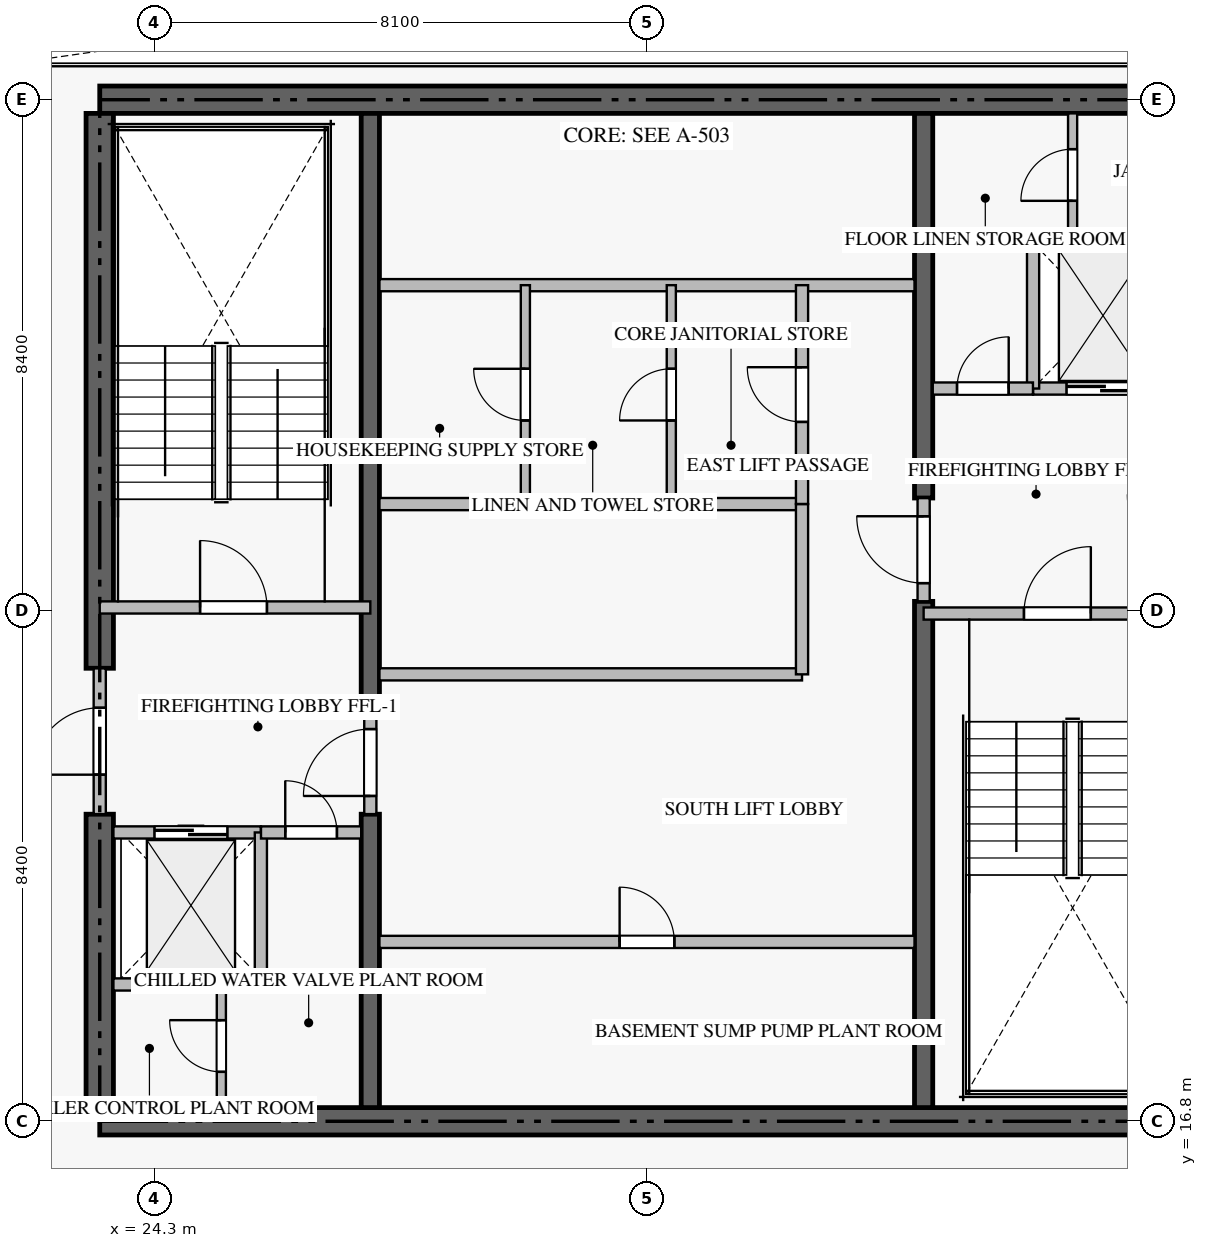
"""IFC4 building model, lengths in metres.
Left out: names, types, materials, properties, quantities, classifications, styles, units other than length and angle.
Written with IfcOpenShell. Run it as: python <this file> out.ifc"""

import sys

from ifc_helpers import new_model, si_unit, direction, frame, frame_2d, origin, place, context, subcontext, project, spatial, rectangle, extrude, source, transform, mapped, element, fill, save


model = new_model("IFC4")
c1 = context("Model", 3, precision=1e-05, world=origin(), true_north=direction((0.0, 1.0)))
c2 = subcontext(c1, "Body", "Model", "MODEL_VIEW")
j1 = project(units=[si_unit("LENGTHUNIT", "METRE"), si_unit("PLANEANGLEUNIT", "RADIAN")], contexts=[c1])
p1 = place(None, origin())
s1 = spatial("IfcSite", under=j1, at=p1, CompositionType="ELEMENT")
p2 = place(p1, origin())
s2 = spatial("IfcBuilding", under=s1, at=p2, CompositionType="ELEMENT")
p3 = place(p2, frame((0.0, 0.0, -3.6)))
s3 = spatial("IfcBuildingStorey", under=s2, at=p3, CompositionType="ELEMENT", Elevation=-3.6)
for number, where, z_axis, x_axis in (
    (1, (23.4, 16.8, -0.36), (0.0, 0.0, 1.0), (1.0, 0.0, 0.0)),
    (2, (41.4, 33.6, -0.36), (0.0, 0.0, 1.0), (-1.0, 0.0, 0.0)),
):
    element("IfcWall", number, at=place(p3, frame(where, z_axis=z_axis, x_axis=x_axis)), inside=s3, PredefinedType="SHEAR", context=c2, shape_type="SweptSolid", body=[
        extrude(rectangle(XDim=18.0, YDim=0.45, at=frame_2d((9.0, 0.0))), origin(), (0.0, 0.0, 1.0), 3.578),
    ])
p4 = place(p3, frame((23.4, 17.025, -0.36), z_axis=(0.0, 0.0, 1.0), x_axis=(0.0, 1.0, 0.0)))
e3 = element("IfcWall", 3, at=p4, inside=s3, PredefinedType="SHEAR", context=c2, shape_type="SweptSolid", body=[
    extrude(rectangle(XDim=4.825, YDim=0.45, at=frame_2d((2.413, 0.0))), origin(), (0.0, 0.0, 1.0), 3.578),
])
p5 = place(p3, frame((23.4, 24.25, -0.36), z_axis=(0.0, 0.0, 1.0), x_axis=(0.0, 1.0, 0.0)))
e4 = element("IfcWall", 4, at=p5, inside=s3, PredefinedType="SHEAR", context=c2, shape_type="SweptSolid", body=[
    extrude(rectangle(XDim=9.125, YDim=0.45, at=frame_2d((4.562, 0.0))), origin(), (0.0, 0.0, 1.0), 3.578),
])
p6 = place(p3, frame((27.85, 17.025, -0.36), z_axis=(0.0, 0.0, 1.0), x_axis=(0.0, 1.0, 0.0)))
e5 = element("IfcWall", 5, at=p6, inside=s3, PredefinedType="SHEAR", context=c2, shape_type="SweptSolid", body=[
    extrude(rectangle(XDim=4.825, YDim=0.3, at=frame_2d((2.413, 0.0))), origin(), (0.0, 0.0, 1.0), 3.578),
])
p7 = place(p3, frame((27.85, 23.55, -0.36), z_axis=(0.0, 0.0, 1.0), x_axis=(0.0, 1.0, 0.0)))
e6 = element("IfcWall", 6, at=p7, inside=s3, PredefinedType="SHEAR", context=c2, shape_type="SweptSolid", body=[
    extrude(rectangle(XDim=9.825, YDim=0.3, at=frame_2d((4.913, 0.0))), origin(), (0.0, 0.0, 1.0), 3.578),
])
p8 = place(p3, frame((36.95, 17.025, -0.36), z_axis=(0.0, 0.0, 1.0), x_axis=(0.0, 1.0, 0.0)))
e7 = element("IfcWall", 7, at=p8, inside=s3, PredefinedType="SHEAR", context=c2, shape_type="SweptSolid", body=[
    extrude(rectangle(XDim=8.325, YDim=0.3, at=frame_2d((4.163, 0.0))), origin(), (0.0, 0.0, 1.0), 3.578),
])
p9 = place(p3, frame((36.95, 27.05, -0.36), z_axis=(0.0, 0.0, 1.0), x_axis=(0.0, 1.0, 0.0)))
e8 = element("IfcWall", 8, at=p9, inside=s3, PredefinedType="SHEAR", context=c2, shape_type="SweptSolid", body=[
    extrude(rectangle(XDim=6.325, YDim=0.3, at=frame_2d((3.163, 0.0))), origin(), (0.0, 0.0, 1.0), 3.578),
])
p10 = place(p3, frame((23.4, 25.25, 0.0), z_axis=(0.0, 0.0, 1.0), x_axis=(1.0, 0.0, 0.0)))
e9 = element("IfcWall", 9, at=p10, inside=s3, PredefinedType="STANDARD", context=c2, shape_type="SweptSolid", body=[
    extrude(rectangle(XDim=4.45, YDim=0.2, at=frame_2d((2.225, 0.0))), origin(), (0.0, 0.0, 1.0), 3.22),
])
p11 = place(p10, frame((1.65, 0.0, 0.0)))
e10 = element("IfcOpeningElement", 10, at=p11, cuts=e9, PredefinedType="OPENING", context=c2, shape_type="SweptSolid", body=[
    extrude(rectangle(XDim=1.1, YDim=2.15, at=frame_2d((0.55, 1.075))), frame((0.0, 0.11, 0.0), z_axis=(0.0, -1.0, 0.0), x_axis=(1.0, 0.0, 0.0)), (0.0, 0.0, 1.0), 0.22),
])
p12 = place(p3, frame((36.95, 25.15, 0.0), z_axis=(0.0, 0.0, 1.0), x_axis=(1.0, 0.0, 0.0)))
e11 = element("IfcWall", 11, at=p12, inside=s3, PredefinedType="STANDARD", context=c2, shape_type="SweptSolid", body=[
    extrude(rectangle(XDim=4.45, YDim=0.2, at=frame_2d((2.225, 0.0))), origin(), (0.0, 0.0, 1.0), 3.22),
])
p13 = place(p12, frame((1.65, 0.0, 0.0)))
e12 = element("IfcOpeningElement", 12, at=p13, cuts=e11, PredefinedType="OPENING", context=c2, shape_type="SweptSolid", body=[
    extrude(rectangle(XDim=1.1, YDim=2.15, at=frame_2d((0.55, 1.075))), frame((0.0, 0.11, 0.0), z_axis=(0.0, -1.0, 0.0), x_axis=(1.0, 0.0, 0.0)), (0.0, 0.0, 1.0), 0.22),
])
p14 = place(p3, frame((23.625, 21.55, 0.0), z_axis=(0.0, 0.0, 1.0), x_axis=(1.0, 0.0, 0.0)))
e13 = element("IfcWall", 13, at=p14, inside=s3, PredefinedType="STANDARD", context=c2, shape_type="SweptSolid", body=[
    extrude(rectangle(XDim=2.425, YDim=0.2, at=frame_2d((1.212, 0.0))), origin(), (0.0, 0.0, 1.0), 3.22),
])
p15 = place(p14, frame((0.675, 0.0, 0.0)))
e14 = element("IfcOpeningElement", 14, at=p15, cuts=e13, PredefinedType="OPENING", context=c2, shape_type="SweptSolid", body=[
    extrude(rectangle(XDim=1.2, YDim=2.2, at=frame_2d((0.6, 1.1))), frame((0.0, 0.11, 0.0), z_axis=(0.0, -1.0, 0.0), x_axis=(1.0, 0.0, 0.0)), (0.0, 0.0, 1.0), 0.22),
])
p16 = place(p3, frame((38.75, 28.85, 0.0), z_axis=(0.0, 0.0, 1.0), x_axis=(1.0, 0.0, 0.0)))
e15 = element("IfcWall", 15, at=p16, inside=s3, PredefinedType="STANDARD", context=c2, shape_type="SweptSolid", body=[
    extrude(rectangle(XDim=2.425, YDim=0.2, at=frame_2d((1.212, 0.0))), origin(), (0.0, 0.0, 1.0), 3.22),
])
p17 = place(p16, frame((0.55, 0.0, 0.0)))
e16 = element("IfcOpeningElement", 16, at=p17, cuts=e15, PredefinedType="OPENING", context=c2, shape_type="SweptSolid", body=[
    extrude(rectangle(XDim=1.2, YDim=2.2, at=frame_2d((0.6, 1.1))), frame((0.0, 0.11, 0.0), z_axis=(0.0, -1.0, 0.0), x_axis=(1.0, 0.0, 0.0)), (0.0, 0.0, 1.0), 0.22),
])
p18 = place(p3, frame((26.05, 19.05, 0.0), z_axis=(0.0, 0.0, 1.0), x_axis=(0.0, 1.0, 0.0)))
e17 = element("IfcWall", 17, at=p18, inside=s3, PredefinedType="STANDARD", context=c2, shape_type="SweptSolid", body=[
    extrude(rectangle(XDim=2.5, YDim=0.2, at=frame_2d((1.25, 0.0))), origin(), (0.0, 0.0, 1.0), 3.22),
])
p19 = place(p3, frame((23.625, 19.05, 0.0), z_axis=(0.0, 0.0, 1.0), x_axis=(1.0, 0.0, 0.0)))
e18 = element("IfcWall", 18, at=p19, inside=s3, PredefinedType="STANDARD", context=c2, shape_type="SweptSolid", body=[
    extrude(rectangle(XDim=2.425, YDim=0.2, at=frame_2d((1.212, 0.0))), origin(), (0.0, 0.0, 1.0), 3.22),
])
p20 = place(p3, frame((26.052, 21.55, 0.0), z_axis=(0.0, 0.0, 1.0), x_axis=(1.0, 0.0, 0.0)))
e19 = element("IfcWall", 19, at=p20, inside=s3, PredefinedType="STANDARD", context=c2, shape_type="SweptSolid", body=[
    extrude(rectangle(XDim=1.648, YDim=0.2, at=frame_2d((0.824, 0.0))), origin(), (0.0, 0.0, 1.0), 3.22),
])
p21 = place(p20, frame((0.399, 0.0, 0.0)))
e20 = element("IfcOpeningElement", 20, at=p21, cuts=e19, PredefinedType="OPENING", context=c2, shape_type="SweptSolid", body=[
    extrude(rectangle(XDim=0.85, YDim=2.1, at=frame_2d((0.425, 1.05))), frame((0.0, 0.11, 0.0), z_axis=(0.0, -1.0, 0.0), x_axis=(1.0, 0.0, 0.0)), (0.0, 0.0, 1.0), 0.22),
])
p22 = place(p3, frame((38.75, 28.85, 0.0), z_axis=(0.0, 0.0, 1.0), x_axis=(0.0, 1.0, 0.0)))
e21 = element("IfcWall", 21, at=p22, inside=s3, PredefinedType="STANDARD", context=c2, shape_type="SweptSolid", body=[
    extrude(rectangle(XDim=2.5, YDim=0.2, at=frame_2d((1.25, 0.0))), origin(), (0.0, 0.0, 1.0), 3.22),
])
p23 = place(p3, frame((38.75, 31.35, 0.0), z_axis=(0.0, 0.0, 1.0), x_axis=(1.0, 0.0, 0.0)))
e22 = element("IfcWall", 22, at=p23, inside=s3, PredefinedType="STANDARD", context=c2, shape_type="SweptSolid", body=[
    extrude(rectangle(XDim=2.425, YDim=0.2, at=frame_2d((1.212, 0.0))), origin(), (0.0, 0.0, 1.0), 3.22),
])
p24 = place(p3, frame((37.1, 28.85, 0.0), z_axis=(0.0, 0.0, 1.0), x_axis=(1.0, 0.0, 0.0)))
e23 = element("IfcWall", 23, at=p24, inside=s3, PredefinedType="STANDARD", context=c2, shape_type="SweptSolid", body=[
    extrude(rectangle(XDim=1.648, YDim=0.2, at=frame_2d((0.824, 0.0))), origin(), (0.0, 0.0, 1.0), 3.22),
])
p25 = place(p24, frame((0.399, 0.0, 0.0)))
e24 = element("IfcOpeningElement", 24, at=p25, cuts=e23, PredefinedType="OPENING", context=c2, shape_type="SweptSolid", body=[
    extrude(rectangle(XDim=0.85, YDim=2.1, at=frame_2d((0.425, 1.05))), frame((0.0, 0.11, 0.0), z_axis=(0.0, -1.0, 0.0), x_axis=(1.0, 0.0, 0.0)), (0.0, 0.0, 1.0), 0.22),
])
p26 = place(p3, frame((23.4, 21.852, 0.0), z_axis=(0.0, 0.0, 1.0), x_axis=(0.0, 1.0, 0.0)))
e25 = element("IfcWall", 25, at=p26, inside=s3, PredefinedType="STANDARD", context=c2, shape_type="SweptSolid", body=[
    extrude(rectangle(XDim=2.396, YDim=0.2, at=frame_2d((1.198, 0.0))), origin(), (0.0, 0.0, 1.0), 3.22),
])
p27 = place(p26, frame((0.648, 0.0, 0.0)))
e26 = element("IfcOpeningElement", 26, at=p27, cuts=e25, PredefinedType="OPENING", context=c2, shape_type="SweptSolid", body=[
    extrude(rectangle(XDim=1.1, YDim=2.15, at=frame_2d((0.55, 1.075))), frame((0.0, 0.11, 0.0), z_axis=(0.0, -1.0, 0.0), x_axis=(1.0, 0.0, 0.0)), (0.0, 0.0, 1.0), 0.22),
])
p28 = place(p3, frame((27.85, 21.852, 0.0), z_axis=(0.0, 0.0, 1.0), x_axis=(0.0, 1.0, 0.0)))
e27 = element("IfcWall", 27, at=p28, inside=s3, PredefinedType="STANDARD", context=c2, shape_type="SweptSolid", body=[
    extrude(rectangle(XDim=1.696, YDim=0.2, at=frame_2d((0.848, 0.0))), origin(), (0.0, 0.0, 1.0), 3.22),
])
p29 = place(p28, frame((0.298, 0.0, 0.0)))
e28 = element("IfcOpeningElement", 28, at=p29, cuts=e27, PredefinedType="OPENING", context=c2, shape_type="SweptSolid", body=[
    extrude(rectangle(XDim=1.1, YDim=2.15, at=frame_2d((0.55, 1.075))), frame((0.0, 0.11, 0.0), z_axis=(0.0, -1.0, 0.0), x_axis=(1.0, 0.0, 0.0)), (0.0, 0.0, 1.0), 0.22),
])
p30 = place(p3, frame((36.95, 25.352, 0.0), z_axis=(0.0, 0.0, 1.0), x_axis=(0.0, 1.0, 0.0)))
e29 = element("IfcWall", 29, at=p30, inside=s3, PredefinedType="STANDARD", context=c2, shape_type="SweptSolid", body=[
    extrude(rectangle(XDim=1.696, YDim=0.2, at=frame_2d((0.848, 0.0))), origin(), (0.0, 0.0, 1.0), 3.22),
])
p31 = place(p30, frame((0.298, 0.0, 0.0)))
e30 = element("IfcOpeningElement", 30, at=p31, cuts=e29, PredefinedType="OPENING", context=c2, shape_type="SweptSolid", body=[
    extrude(rectangle(XDim=1.1, YDim=2.15, at=frame_2d((0.55, 1.075))), frame((0.0, 0.11, 0.0), z_axis=(0.0, -1.0, 0.0), x_axis=(1.0, 0.0, 0.0)), (0.0, 0.0, 1.0), 0.22),
])
p32 = place(p3, frame((28.0, 30.55, 0.0), z_axis=(0.0, 0.0, 1.0), x_axis=(1.0, 0.0, 0.0)))
e31 = element("IfcWall", 31, at=p32, inside=s3, PredefinedType="STANDARD", context=c2, shape_type="SweptSolid", body=[
    extrude(rectangle(XDim=8.8, YDim=0.2, at=frame_2d((4.4, 0.0))), origin(), (0.0, 0.0, 1.0), 3.22),
])
p33 = place(p3, frame((28.0, 19.75, 0.0), z_axis=(0.0, 0.0, 1.0), x_axis=(1.0, 0.0, 0.0)))
e32 = element("IfcWall", 32, at=p33, inside=s3, PredefinedType="STANDARD", context=c2, shape_type="SweptSolid", body=[
    extrude(rectangle(XDim=8.8, YDim=0.2, at=frame_2d((4.4, 0.0))), origin(), (0.0, 0.0, 1.0), 3.22),
])
p34 = place(p33, frame((3.95, 0.0, 0.0)))
e33 = element("IfcOpeningElement", 33, at=p34, cuts=e32, PredefinedType="OPENING", context=c2, shape_type="SweptSolid", body=[
    extrude(rectangle(XDim=0.9, YDim=2.1, at=frame_2d((0.45, 1.05))), frame((0.0, 0.11, 0.0), z_axis=(0.0, -1.0, 0.0), x_axis=(1.0, 0.0, 0.0)), (0.0, 0.0, 1.0), 0.22),
])
for number, where, z_axis, x_axis in (
    (34, (28.0, 24.15, 0.0), (0.0, 0.0, 1.0), (1.0, 0.0, 0.0)),
    (35, (28.0, 26.95, 0.0), (0.0, 0.0, 1.0), (1.0, 0.0, 0.0)),
):
    element("IfcWall", number, at=place(p3, frame(where, z_axis=z_axis, x_axis=x_axis)), inside=s3, PredefinedType="STANDARD", context=c2, shape_type="SweptSolid", body=[
        extrude(rectangle(XDim=6.95, YDim=0.2, at=frame_2d((3.475, 0.0))), origin(), (0.0, 0.0, 1.0), 3.22),
    ])
p35 = place(p3, frame((34.95, 24.15, 0.0), z_axis=(0.0, 0.0, 1.0), x_axis=(0.0, 1.0, 0.0)))
e36 = element("IfcWall", 36, at=p35, inside=s3, PredefinedType="STANDARD", context=c2, shape_type="SweptSolid", body=[
    extrude(rectangle(XDim=2.8, YDim=0.2, at=frame_2d((1.4, 0.0))), origin(), (0.0, 0.0, 1.0), 3.22),
])
p36 = place(p3, frame((25.4, 17.025, 0.0), z_axis=(0.0, 0.0, 1.0), x_axis=(0.0, 1.0, 0.0)))
e37 = element("IfcWall", 37, at=p36, inside=s3, PredefinedType="PARTITIONING", context=c2, shape_type="SweptSolid", body=[
    extrude(rectangle(XDim=2.025, YDim=0.15, at=frame_2d((1.013, 0.0))), origin(), (0.0, 0.0, 1.0), 3.22),
])
p37 = place(p36, frame((0.588, 0.0, 0.0)))
e38 = element("IfcOpeningElement", 38, at=p37, cuts=e37, PredefinedType="OPENING", context=c2, shape_type="SweptSolid", body=[
    extrude(rectangle(XDim=0.85, YDim=2.1, at=frame_2d((0.425, 1.05))), frame((0.0, 0.085, 0.0), z_axis=(0.0, -1.0, 0.0), x_axis=(1.0, 0.0, 0.0)), (0.0, 0.0, 1.0), 0.17),
])
p38 = place(p3, frame((39.4, 31.35, 0.0), z_axis=(0.0, 0.0, 1.0), x_axis=(0.0, 1.0, 0.0)))
e39 = element("IfcWall", 39, at=p38, inside=s3, PredefinedType="PARTITIONING", context=c2, shape_type="SweptSolid", body=[
    extrude(rectangle(XDim=2.025, YDim=0.15, at=frame_2d((1.012, 0.0))), origin(), (0.0, 0.0, 1.0), 3.22),
])
p39 = place(p38, frame((0.587, 0.0, 0.0)))
e40 = element("IfcOpeningElement", 40, at=p39, cuts=e39, PredefinedType="OPENING", context=c2, shape_type="SweptSolid", body=[
    extrude(rectangle(XDim=0.85, YDim=2.1, at=frame_2d((0.425, 1.05))), frame((0.0, 0.085, 0.0), z_axis=(0.0, -1.0, 0.0), x_axis=(1.0, 0.0, 0.0)), (0.0, 0.0, 1.0), 0.17),
])
p40 = place(p3, frame((34.95, 26.952, 0.0), z_axis=(0.0, 0.0, 1.0), x_axis=(0.0, 1.0, 0.0)))
e41 = element("IfcWall", 41, at=p40, inside=s3, PredefinedType="STANDARD", context=c2, shape_type="SweptSolid", body=[
    extrude(rectangle(XDim=3.598, YDim=0.2, at=frame_2d((1.799, 0.0))), origin(), (0.0, 0.0, 1.0), 3.22),
])
p41 = place(p40, frame((1.349, 0.0, 0.0)))
e42 = element("IfcOpeningElement", 42, at=p41, cuts=e41, PredefinedType="OPENING", context=c2, shape_type="SweptSolid", body=[
    extrude(rectangle(XDim=0.9, YDim=2.1, at=frame_2d((0.45, 1.05))), frame((0.0, 0.11, 0.0), z_axis=(0.0, -1.0, 0.0), x_axis=(1.0, 0.0, 0.0)), (0.0, 0.0, 1.0), 0.22),
])
p42 = place(p3, frame((32.8, 26.95, 0.0), z_axis=(0.0, 0.0, 1.0), x_axis=(0.0, 1.0, 0.0)))
e43 = element("IfcWall", 43, at=p42, inside=s3, PredefinedType="PARTITIONING", context=c2, shape_type="SweptSolid", body=[
    extrude(rectangle(XDim=3.6, YDim=0.15, at=frame_2d((1.8, 0.0))), origin(), (0.0, 0.0, 1.0), 3.22),
])
p43 = place(p42, frame((1.375, 0.0, 0.0)))
e44 = element("IfcOpeningElement", 44, at=p43, cuts=e43, PredefinedType="OPENING", context=c2, shape_type="SweptSolid", body=[
    extrude(rectangle(XDim=0.85, YDim=2.1, at=frame_2d((0.425, 1.05))), frame((0.0, 0.085, 0.0), z_axis=(0.0, -1.0, 0.0), x_axis=(1.0, 0.0, 0.0)), (0.0, 0.0, 1.0), 0.17),
])
p44 = place(p3, frame((30.4, 26.95, 0.0), z_axis=(0.0, 0.0, 1.0), x_axis=(0.0, 1.0, 0.0)))
e45 = element("IfcWall", 45, at=p44, inside=s3, PredefinedType="PARTITIONING", context=c2, shape_type="SweptSolid", body=[
    extrude(rectangle(XDim=3.6, YDim=0.15, at=frame_2d((1.8, 0.0))), origin(), (0.0, 0.0, 1.0), 3.22),
])
p45 = place(p44, frame((1.375, 0.0, 0.0)))
e46 = element("IfcOpeningElement", 46, at=p45, cuts=e45, PredefinedType="OPENING", context=c2, shape_type="SweptSolid", body=[
    extrude(rectangle(XDim=0.85, YDim=2.1, at=frame_2d((0.425, 1.05))), frame((0.0, 0.085, 0.0), z_axis=(0.0, -1.0, 0.0), x_axis=(1.0, 0.0, 0.0)), (0.0, 0.0, 1.0), 0.17),
])
m1 = source(origin(), c2, "Body", "SweptSolid", [
    extrude(rectangle(XDim=1.1, YDim=2.15, at=frame_2d((0.55, 1.075))), frame((0.0, 0.025, 0.0), z_axis=(0.0, -1.0, 0.0), x_axis=(1.0, 0.0, 0.0)), (0.0, 0.0, 1.0), 0.05),
])
p46 = place(p11, origin())
e47 = element("IfcDoor", 47, at=p46, inside=s3, OperationType="SINGLE_SWING_LEFT", PredefinedType="DOOR", context=c2, shape_type="MappedRepresentation", body=[
    mapped(m1, transform((0.0, 0.0, 0.0), scale=1.0)),
])
fill(e10, e47)
p47 = place(p13, origin())
e48 = element("IfcDoor", 48, at=p47, inside=s3, OperationType="SINGLE_SWING_RIGHT", PredefinedType="DOOR", context=c2, shape_type="MappedRepresentation", body=[
    mapped(m1, transform((0.0, 0.0, 0.0), scale=1.0)),
])
fill(e12, e48)
m2 = source(origin(), c2, "Body", "SweptSolid", [
    extrude(rectangle(XDim=1.2, YDim=2.2, at=frame_2d((0.6, 1.1))), frame((0.0, 0.025, 0.0), z_axis=(0.0, -1.0, 0.0), x_axis=(1.0, 0.0, 0.0)), (0.0, 0.0, 1.0), 0.05),
])
p48 = place(p15, origin())
e49 = element("IfcDoor", 49, at=p48, inside=s3, OperationType="DOUBLE_DOOR_SLIDING", PredefinedType="DOOR", context=c2, shape_type="MappedRepresentation", body=[
    mapped(m2, transform((0.0, 0.0, 0.0), scale=1.0)),
])
fill(e14, e49)
p49 = place(p17, origin())
e50 = element("IfcDoor", 50, at=p49, inside=s3, OperationType="DOUBLE_DOOR_SLIDING", PredefinedType="DOOR", context=c2, shape_type="MappedRepresentation", body=[
    mapped(m2, transform((0.0, 0.0, 0.0), scale=1.0)),
])
fill(e16, e50)
m3 = source(origin(), c2, "Body", "SweptSolid", [
    extrude(rectangle(XDim=0.85, YDim=2.1, at=frame_2d((0.425, 1.05))), frame((0.0, 0.025, 0.0), z_axis=(0.0, -1.0, 0.0), x_axis=(1.0, 0.0, 0.0)), (0.0, 0.0, 1.0), 0.05),
])
p50 = place(p21, origin())
e51 = element("IfcDoor", 51, at=p50, inside=s3, OperationType="SINGLE_SWING_LEFT", PredefinedType="DOOR", context=c2, shape_type="MappedRepresentation", body=[
    mapped(m3, transform((0.0, 0.0, 0.0), scale=1.0)),
])
fill(e20, e51)
p51 = place(p25, origin())
e52 = element("IfcDoor", 52, at=p51, inside=s3, OperationType="SINGLE_SWING_RIGHT", PredefinedType="DOOR", context=c2, shape_type="MappedRepresentation", body=[
    mapped(m3, transform((0.0, 0.0, 0.0), scale=1.0)),
])
fill(e24, e52)
p52 = place(p27, origin())
e53 = element("IfcDoor", 53, at=p52, inside=s3, OperationType="SINGLE_SWING_LEFT", PredefinedType="DOOR", context=c2, shape_type="MappedRepresentation", body=[
    mapped(m1, transform((0.0, 0.0, 0.0), scale=1.0)),
])
fill(e26, e53)
p53 = place(p29, origin())
e54 = element("IfcDoor", 54, at=p53, inside=s3, OperationType="SINGLE_SWING_LEFT", PredefinedType="DOOR", context=c2, shape_type="MappedRepresentation", body=[
    mapped(m1, transform((0.0, 0.0, 0.0), scale=1.0)),
])
fill(e28, e54)
p54 = place(p31, origin())
e55 = element("IfcDoor", 55, at=p54, inside=s3, OperationType="SINGLE_SWING_RIGHT", PredefinedType="DOOR", context=c2, shape_type="MappedRepresentation", body=[
    mapped(m1, transform((0.0, 0.0, 0.0), scale=1.0)),
])
fill(e30, e55)
m4 = source(origin(), c2, "Body", "SweptSolid", [
    extrude(rectangle(XDim=0.9, YDim=2.1, at=frame_2d((0.45, 1.05))), frame((0.0, 0.025, 0.0), z_axis=(0.0, -1.0, 0.0), x_axis=(1.0, 0.0, 0.0)), (0.0, 0.0, 1.0), 0.05),
])
p55 = place(p34, origin())
e56 = element("IfcDoor", 56, at=p55, inside=s3, OperationType="SINGLE_SWING_LEFT", PredefinedType="DOOR", context=c2, shape_type="MappedRepresentation", body=[
    mapped(m4, transform((0.0, 0.0, 0.0), scale=1.0)),
])
fill(e33, e56)
p56 = place(p37, origin())
e57 = element("IfcDoor", 57, at=p56, inside=s3, OperationType="SINGLE_SWING_RIGHT", PredefinedType="DOOR", context=c2, shape_type="MappedRepresentation", body=[
    mapped(m3, transform((0.0, 0.0, 0.0), scale=1.0)),
])
fill(e38, e57)
p57 = place(p39, origin())
e58 = element("IfcDoor", 58, at=p57, inside=s3, OperationType="SINGLE_SWING_LEFT", PredefinedType="DOOR", context=c2, shape_type="MappedRepresentation", body=[
    mapped(m3, transform((0.0, 0.0, 0.0), scale=1.0)),
])
fill(e40, e58)
p58 = place(p41, origin())
e59 = element("IfcDoor", 59, at=p58, inside=s3, OperationType="SINGLE_SWING_RIGHT", PredefinedType="DOOR", context=c2, shape_type="MappedRepresentation", body=[
    mapped(m4, transform((0.0, 0.0, 0.0), scale=1.0)),
])
fill(e42, e59)
p59 = place(p43, origin())
e60 = element("IfcDoor", 60, at=p59, inside=s3, OperationType="SINGLE_SWING_LEFT", PredefinedType="DOOR", context=c2, shape_type="MappedRepresentation", body=[
    mapped(m3, transform((0.0, 0.0, 0.0), scale=1.0)),
])
fill(e44, e60)
p60 = place(p45, origin())
e61 = element("IfcDoor", 61, at=p60, inside=s3, OperationType="SINGLE_SWING_RIGHT", PredefinedType="DOOR", context=c2, shape_type="MappedRepresentation", body=[
    mapped(m3, transform((0.0, 0.0, 0.0), scale=1.0)),
])
fill(e46, e61)
save(model, sys.argv[1])
